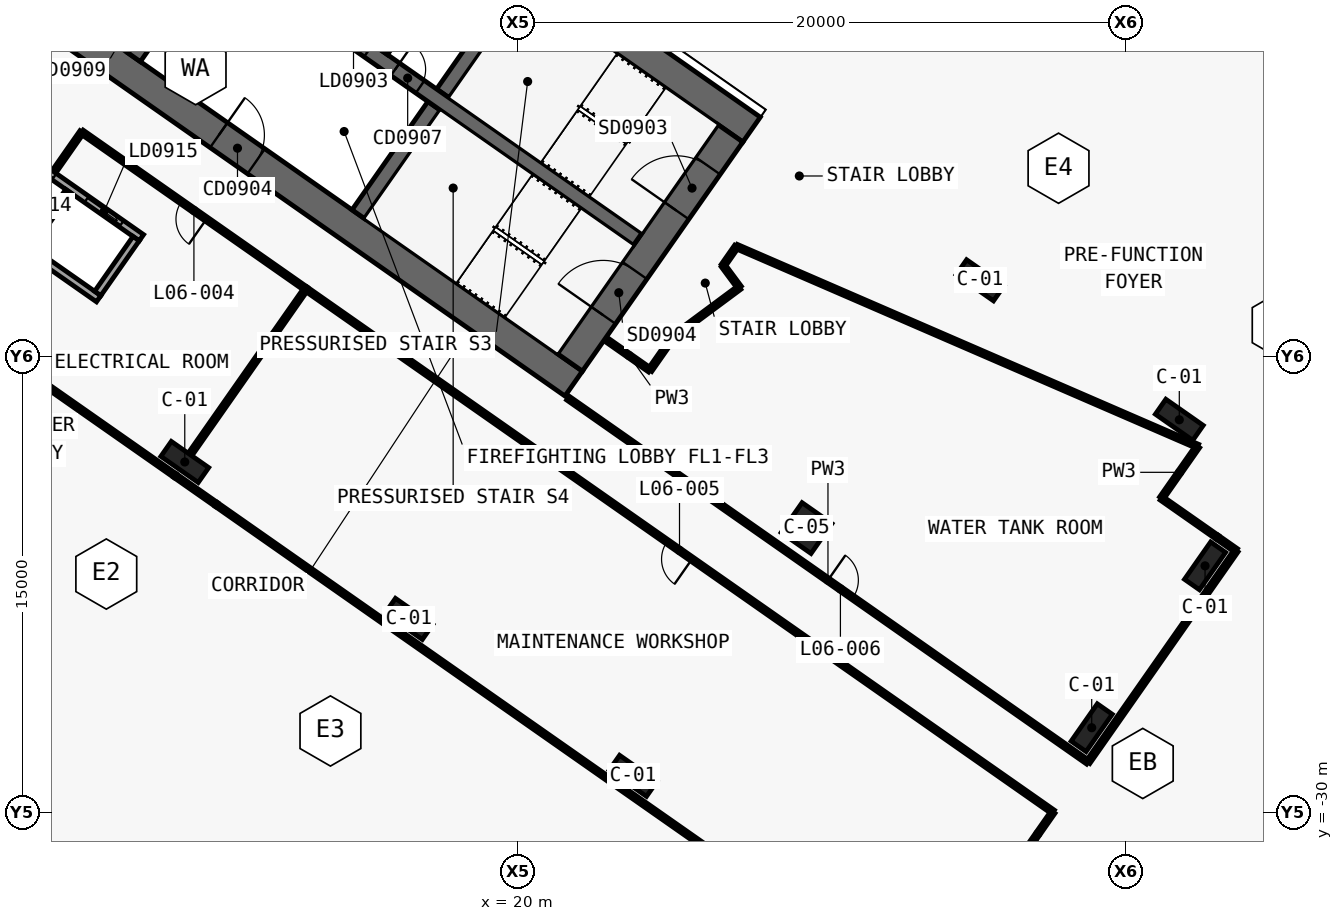
"""IFC4 building model, lengths in metres.
Left out: names, types, materials, properties, quantities, classifications, styles, units other than length and angle.
Written with IfcOpenShell. Run it as: python <this file> out.ifc"""

import sys

from ifc_helpers import new_model, si_unit, direction, frame, frame_2d, origin, origin_2d, place, context, subcontext, project, spatial, polyline, rectangle, outline, extrude, element, fill, save


model = new_model("IFC4")
c1 = context("Model", 3, precision=1e-05, world=origin(), true_north=direction((0.0, 1.0)))
c2 = subcontext(c1, "Body", "Model", "MODEL_VIEW")
j1 = project(units=[si_unit("LENGTHUNIT", "METRE"), si_unit("PLANEANGLEUNIT", "RADIAN")], contexts=[c1])
p1 = place(None, origin())
s1 = spatial("IfcSite", under=j1, at=p1, CompositionType="ELEMENT")
p2 = place(p1, origin())
s2 = spatial("IfcBuilding", under=s1, at=p2, CompositionType="ELEMENT")
p3 = place(p2, frame((0.0, 0.0, 43.0)))
s3 = spatial("IfcBuildingStorey", under=s2, at=p3, CompositionType="ELEMENT", Elevation=43.0)
p4 = place(p3, frame((-0.037, 11.867, 0.0), z_axis=(0.0, 0.0, 1.0), x_axis=(0.819155306259, -0.573571777746, 0.0)))
e1 = element("IfcWall", 1, at=p4, inside=s3, PredefinedType="SHEAR", context=c2, shape_type="SweptSolid", body=[
    extrude(outline(polyline([(33.837, 0.5), (0.0, 0.5), (0.7, -0.5), (33.837, -0.5), (33.837, 0.5)])), origin(), (0.0, 0.0, 1.0), 5.5),
])
p5 = place(p3, frame((-0.037, -0.585, 0.0), z_axis=(0.0, 0.0, 1.0), x_axis=(0.819157152511, -0.573569140985, 0.0)))
e2 = element("IfcWall", 2, at=p5, inside=s3, PredefinedType="SHEAR", context=c2, shape_type="SweptSolid", body=[
    extrude(outline(polyline([(26.695, 0.5), (0.0, 0.5), (0.7, -0.5), (26.695, -0.5), (26.695, 0.5)])), origin(), (0.0, 0.0, 1.0), 5.5),
])
p6 = place(p5, frame((1.245, 0.0, 0.0)))
e3 = element("IfcOpeningElement", 3, at=p6, cuts=e2, PredefinedType="OPENING", context=c2, shape_type="SweptSolid", body=[
    extrude(rectangle(XDim=1.5, YDim=2.1, at=frame_2d((0.75, 1.05))), frame((0.0, 0.51, 0.0), z_axis=(0.0, -1.0, 0.0), x_axis=(1.0, 0.0, 0.0)), (0.0, 0.0, 1.0), 1.02),
])
p7 = place(p5, frame((12.445, 0.0, 0.0)))
e4 = element("IfcOpeningElement", 4, at=p7, cuts=e2, PredefinedType="OPENING", context=c2, shape_type="SweptSolid", body=[
    extrude(rectangle(XDim=1.5, YDim=2.1, at=frame_2d((0.75, 1.05))), frame((0.0, 0.51, 0.0), z_axis=(0.0, -1.0, 0.0), x_axis=(1.0, 0.0, 0.0)), (0.0, 0.0, 1.0), 1.02),
])
p8 = place(p3, frame((21.708, -15.2, 0.0), z_axis=(0.0, 0.0, 1.0), x_axis=(0.573576324356, 0.819152122709, 0.0)))
e5 = element("IfcWall", 5, at=p8, inside=s3, PredefinedType="SHEAR", context=c2, shape_type="SweptSolid", body=[
    extrude(outline(polyline([(9.2, 0.5), (0.0, 0.5), (0.0, -0.5), (9.2, -0.5), (9.2, 0.5)])), origin(), (0.0, 0.0, 1.0), 5.5),
])
p9 = place(p8, frame((6.1, 0.0, 0.0)))
e6 = element("IfcOpeningElement", 6, at=p9, cuts=e5, PredefinedType="OPENING", context=c2, shape_type="SweptSolid", body=[
    extrude(rectangle(XDim=1.8, YDim=2.1, at=frame_2d((0.9, 1.05))), frame((0.0, 0.51, 0.0), z_axis=(0.0, -1.0, 0.0), x_axis=(1.0, 0.0, 0.0)), (0.0, 0.0, 1.0), 1.02),
])
p10 = place(p8, frame((1.9, 0.0, 0.0)))
e7 = element("IfcOpeningElement", 7, at=p10, cuts=e5, PredefinedType="OPENING", context=c2, shape_type="SweptSolid", body=[
    extrude(rectangle(XDim=1.8, YDim=2.1, at=frame_2d((0.9, 1.05))), frame((0.0, 0.51, 0.0), z_axis=(0.0, -1.0, 0.0), x_axis=(1.0, 0.0, 0.0)), (0.0, 0.0, 1.0), 1.02),
])
p11 = place(p3, frame((7.372, -5.162, 0.0), z_axis=(0.0, 0.0, 1.0), x_axis=(0.573594173421, 0.819139624372, 0.0)))
e8 = element("IfcWall", 8, at=p11, inside=s3, PredefinedType="SHEAR", context=c2, shape_type="SweptSolid", body=[
    extrude(outline(polyline([(0.0, 0.25), (0.0, -0.25), (4.35, -0.25), (4.35, 0.25), (0.0, 0.25)])), origin(), (0.0, 0.0, 1.0), 5.5),
])
p12 = place(p3, frame((14.745, -10.324, 0.0), z_axis=(0.0, 0.0, 1.0), x_axis=(0.57356780395, 0.819158088694, 0.0)))
e9 = element("IfcWall", 9, at=p12, inside=s3, PredefinedType="SHEAR", context=c2, shape_type="SweptSolid", body=[
    extrude(outline(polyline([(0.0, 0.25), (0.0, -0.25), (4.35, -0.25), (4.35, 0.25), (0.0, 0.25)])), origin(), (0.0, 0.0, 1.0), 5.5),
])
p13 = place(p3, frame((17.527, -6.352, 0.0), z_axis=(0.0, 0.0, 1.0), x_axis=(0.573530143085, 0.819184457233, 0.0)))
e10 = element("IfcWall", 10, at=p13, inside=s3, PredefinedType="SHEAR", context=c2, shape_type="SweptSolid", body=[
    extrude(outline(polyline([(4.35, -0.25), (4.35, 0.25), (0.0, 0.25), (0.0, -0.25), (4.35, -0.25)])), origin(), (0.0, 0.0, 1.0), 5.5),
])
p14 = place(p3, frame((2.638, 3.768, 0.0), z_axis=(0.0, 0.0, 1.0), x_axis=(0.819148977158, -0.573580816643, 0.0)))
e11 = element("IfcWall", 11, at=p14, inside=s3, PredefinedType="SHEAR", context=c2, shape_type="SweptSolid", body=[
    extrude(outline(polyline([(0.0, 0.25), (0.0, -0.25), (26.0, -0.25), (26.0, 0.25), (0.0, 0.25)])), origin(), (0.0, 0.0, 1.0), 5.5),
])
p15 = place(p14, frame((9.637, 0.0, 0.0)))
e12 = element("IfcOpeningElement", 12, at=p15, cuts=e11, PredefinedType="OPENING", context=c2, shape_type="SweptSolid", body=[
    extrude(rectangle(XDim=1.2, YDim=2.1, at=frame_2d((0.6, 1.05))), frame((0.0, 0.26, 0.0), z_axis=(0.0, -1.0, 0.0), x_axis=(1.0, 0.0, 0.0)), (0.0, 0.0, 1.0), 0.52),
])
p16 = place(p14, frame((11.812, 0.0, 0.0)))
e13 = element("IfcOpeningElement", 13, at=p16, cuts=e11, PredefinedType="OPENING", context=c2, shape_type="SweptSolid", body=[
    extrude(rectangle(XDim=1.2, YDim=2.1, at=frame_2d((0.6, 1.05))), frame((0.0, 0.26, 0.0), z_axis=(0.0, -1.0, 0.0), x_axis=(1.0, 0.0, 0.0)), (0.0, 0.0, 1.0), 0.52),
])
p17 = place(p14, frame((13.988, 0.0, 0.0)))
e14 = element("IfcOpeningElement", 14, at=p17, cuts=e11, PredefinedType="OPENING", context=c2, shape_type="SweptSolid", body=[
    extrude(rectangle(XDim=1.2, YDim=2.1, at=frame_2d((0.6, 1.05))), frame((0.0, 0.26, 0.0), z_axis=(0.0, -1.0, 0.0), x_axis=(1.0, 0.0, 0.0)), (0.0, 0.0, 1.0), 0.52),
])
p18 = place(p14, frame((16.262, 0.0, 0.0)))
e15 = element("IfcOpeningElement", 15, at=p18, cuts=e11, PredefinedType="OPENING", context=c2, shape_type="SweptSolid", body=[
    extrude(rectangle(XDim=1.0, YDim=2.1, at=frame_2d((0.5, 1.05))), frame((0.0, 0.26, 0.0), z_axis=(0.0, -1.0, 0.0), x_axis=(1.0, 0.0, 0.0)), (0.0, 0.0, 1.0), 0.52),
])
for number, where, z_axis, x_axis in (
    (16, (9.038, -18.475, 0.0), (0.0, 0.0, 1.0), (0.819, -0.574, 0.0)),
    (17, (16.41, -23.637, 0.0), (0.0, 0.0, 1.0), (0.819, -0.574, 0.0)),
    (18, (23.782, -28.799, 0.0), (0.0, 0.0, 1.0), (0.819, -0.574, 0.0)),
    (19, (35.197, -12.498, 0.0), (0.0, 0.0, 1.0), (0.819, -0.574, 0.0)),
    (20, (41.75, -17.087, 0.0), (0.0, 0.0, 1.0), (0.819, -0.574, 0.0)),
    (21, (38.869, -27.216, 0.0), (0.0, 0.0, 1.0), (0.574, 0.819, 0.0)),
    (22, (42.597, -21.892, 0.0), (0.0, 0.0, 1.0), (0.574, 0.819, 0.0)),
):
    element("IfcColumn", number, at=place(p3, frame(where, z_axis=z_axis, x_axis=x_axis)), inside=s3, PredefinedType="COLUMN", context=c2, shape_type="SweptSolid", body=[
        extrude(rectangle(XDim=1.5, YDim=0.6, at=origin_2d()), origin(), (0.0, 0.0, 1.0), 5.5),
    ])
p19 = place(p3, frame((29.49, -20.649, 0.0), z_axis=(0.0, 0.0, 1.0), x_axis=(0.819152044289, -0.573576436351, 0.0)))
e23 = element("IfcColumn", 23, at=p19, inside=s3, PredefinedType="COLUMN", context=c2, shape_type="SweptSolid", body=[
    extrude(rectangle(XDim=1.2, YDim=1.2, at=origin_2d()), origin(), (0.0, 0.0, 1.0), 5.5),
])
p20 = place(p3, frame((15.622, -5.018, 0.0), z_axis=(0.0, 0.0, 1.0), x_axis=(0.573594173421, 0.819139624372, 0.0)))
e24 = element("IfcWall", 24, at=p20, inside=s3, PredefinedType="SOLIDWALL", context=c2, shape_type="SweptSolid", body=[
    extrude(rectangle(XDim=4.35, YDim=0.2, at=frame_2d((2.175, 0.0))), origin(), (0.0, 0.0, 1.0), 5.5),
])
p21 = place(p3, frame((-2.887, -6.738, 0.0), z_axis=(0.0, 0.0, 1.0), x_axis=(0.819150280716, -0.573578954985, 0.0)))
e25 = element("IfcWall", 25, at=p21, inside=s3, PredefinedType="SOLIDWALL", context=c2, shape_type="SweptSolid", body=[
    extrude(rectangle(XDim=11.1, YDim=0.25, at=frame_2d((5.55, 0.0))), origin(), (0.0, 0.0, 1.0), 5.22),
])
p22 = place(p3, frame((-1.481, -4.731, 0.0), z_axis=(0.0, 0.0, 1.0), x_axis=(0.819150280716, -0.573578954985, 0.0)))
e26 = element("IfcWall", 26, at=p22, inside=s3, PredefinedType="SOLIDWALL", context=c2, shape_type="SweptSolid", body=[
    extrude(rectangle(XDim=11.1, YDim=0.25, at=frame_2d((5.55, 0.0))), origin(), (0.0, 0.0, 1.0), 5.22),
])
p23 = place(p22, frame((0.8, 0.0, 0.0)))
e27 = element("IfcOpeningElement", 27, at=p23, cuts=e26, PredefinedType="OPENING", context=c2, shape_type="SweptSolid", body=[
    extrude(rectangle(XDim=1.4, YDim=2.1, at=frame_2d((0.7, 1.05))), frame((0.0, 0.135, 0.0), z_axis=(0.0, -1.0, 0.0), x_axis=(1.0, 0.0, 0.0)), (0.0, 0.0, 1.0), 0.27),
])
p24 = place(p22, frame((3.5, 0.0, 0.0)))
e28 = element("IfcOpeningElement", 28, at=p24, cuts=e26, PredefinedType="OPENING", context=c2, shape_type="SweptSolid", body=[
    extrude(rectangle(XDim=1.4, YDim=2.1, at=frame_2d((0.7, 1.05))), frame((0.0, 0.135, 0.0), z_axis=(0.0, -1.0, 0.0), x_axis=(1.0, 0.0, 0.0)), (0.0, 0.0, 1.0), 0.27),
])
p25 = place(p22, frame((6.2, 0.0, 0.0)))
e29 = element("IfcOpeningElement", 29, at=p25, cuts=e26, PredefinedType="OPENING", context=c2, shape_type="SweptSolid", body=[
    extrude(rectangle(XDim=1.4, YDim=2.1, at=frame_2d((0.7, 1.05))), frame((0.0, 0.135, 0.0), z_axis=(0.0, -1.0, 0.0), x_axis=(1.0, 0.0, 0.0)), (0.0, 0.0, 1.0), 0.27),
])
p26 = place(p22, frame((8.9, 0.0, 0.0)))
e30 = element("IfcOpeningElement", 30, at=p26, cuts=e26, PredefinedType="OPENING", context=c2, shape_type="SweptSolid", body=[
    extrude(rectangle(XDim=1.4, YDim=2.1, at=frame_2d((0.7, 1.05))), frame((0.0, 0.135, 0.0), z_axis=(0.0, -1.0, 0.0), x_axis=(1.0, 0.0, 0.0)), (0.0, 0.0, 1.0), 0.27),
])
p27 = place(p3, frame((6.175, -12.93, 0.0), z_axis=(0.0, 0.0, 1.0), x_axis=(0.573559170999, 0.819164133348, 0.0)))
e31 = element("IfcWall", 31, at=p27, inside=s3, PredefinedType="SOLIDWALL", context=c2, shape_type="SweptSolid", body=[
    extrude(rectangle(XDim=2.2, YDim=0.25, at=frame_2d((1.1, 0.0))), origin(), (0.0, 0.0, 1.0), 5.22),
])
p28 = place(p3, frame((3.943, -11.367, 0.0), z_axis=(0.0, 0.0, 1.0), x_axis=(0.573507030513, 0.819200638399, 0.0)))
e32 = element("IfcWall", 32, at=p28, inside=s3, PredefinedType="SOLIDWALL", context=c2, shape_type="SweptSolid", body=[
    extrude(rectangle(XDim=2.2, YDim=0.2, at=frame_2d((1.1, 0.0))), origin(), (0.0, 0.0, 1.0), 5.22),
])
p29 = place(p3, frame((21.642, -16.375, 0.0), z_axis=(0.0, 0.0, 1.0), x_axis=(0.819148965066, -0.573580833911, 0.0)))
e33 = element("IfcWall", 33, at=p29, inside=s3, PredefinedType="PARTITIONING", context=c2, shape_type="SweptSolid", body=[
    extrude(rectangle(XDim=20.88, YDim=0.15, at=frame_2d((10.44, 0.0))), origin(), (0.0, 0.0, 1.0), 4.4),
])
p30 = place(p29, frame((10.44, 0.0, 0.0)))
e34 = element("IfcOpeningElement", 34, at=p30, cuts=e33, PredefinedType="OPENING", context=c2, shape_type="SweptSolid", body=[
    extrude(rectangle(XDim=1.0, YDim=2.1, at=frame_2d((0.5, 1.05))), frame((0.0, 0.085, 0.0), z_axis=(0.0, -1.0, 0.0), x_axis=(1.0, 0.0, 0.0)), (0.0, 0.0, 1.0), 0.17),
])
p31 = place(p3, frame((13.026, -12.783, 0.0), z_axis=(0.0, 0.0, 1.0), x_axis=(-0.81915291695, 0.57357519006, 0.0)))
e35 = element("IfcWall", 35, at=p31, inside=s3, PredefinedType="PARTITIONING", context=c2, shape_type="SweptSolid", body=[
    extrude(rectangle(XDim=9.002, YDim=0.15, at=frame_2d((4.501, 0.0))), origin(), (0.0, 0.0, 1.0), 4.5),
])
p32 = place(p31, frame((4.001, 0.0, 0.0)))
e36 = element("IfcOpeningElement", 36, at=p32, cuts=e35, PredefinedType="OPENING", context=c2, shape_type="SweptSolid", body=[
    extrude(rectangle(XDim=1.0, YDim=2.1, at=frame_2d((0.5, 1.05))), frame((0.0, 0.085, 0.0), z_axis=(0.0, -1.0, 0.0), x_axis=(1.0, 0.0, 0.0)), (0.0, 0.0, 1.0), 0.17),
])
p33 = place(p3, frame((37.599, -29.989, 0.0), z_axis=(0.0, 0.0, 1.0), x_axis=(-0.819154688631, 0.57357265982, 0.0)))
e37 = element("IfcWall", 37, at=p33, inside=s3, PredefinedType="PARTITIONING", context=c2, shape_type="SweptSolid", body=[
    extrude(rectangle(XDim=30.002, YDim=0.15, at=frame_2d((15.001, 0.0))), origin(), (0.0, 0.0, 1.0), 4.4),
])
p34 = place(p33, frame((14.501, 0.0, 0.0)))
e38 = element("IfcOpeningElement", 38, at=p34, cuts=e37, PredefinedType="OPENING", context=c2, shape_type="SweptSolid", body=[
    extrude(rectangle(XDim=1.0, YDim=2.1, at=frame_2d((0.5, 1.05))), frame((0.0, 0.085, 0.0), z_axis=(0.0, -1.0, 0.0), x_axis=(1.0, 0.0, 0.0)), (0.0, 0.0, 1.0), 0.17),
])
p35 = place(p3, frame((42.357, -17.962, 0.0), z_axis=(0.0, 0.0, 1.0), x_axis=(-0.573533201177, -0.819182316183, 0.0)))
e39 = element("IfcWall", 39, at=p35, inside=s3, PredefinedType="PARTITIONING", context=c2, shape_type="SweptSolid", body=[
    extrude(rectangle(XDim=2.081, YDim=0.15, at=frame_2d((1.041, 0.0))), origin(), (0.0, 0.0, 1.0), 4.4),
])
p36 = place(p3, frame((41.164, -19.667, 0.0), z_axis=(0.0, 0.0, 1.0), x_axis=(0.81912956014, -0.573608545704, 0.0)))
e40 = element("IfcWall", 40, at=p36, inside=s3, PredefinedType="PARTITIONING", context=c2, shape_type="SweptSolid", body=[
    extrude(rectangle(XDim=2.241, YDim=0.15, at=frame_2d((1.121, 0.0))), origin(), (0.0, 0.0, 1.0), 4.4),
])
p37 = place(p3, frame((42.998, -20.952, 0.0), z_axis=(0.0, 0.0, 1.0), x_axis=(0.819141432686, -0.573591590992, 0.0)))
e41 = element("IfcWall", 41, at=p37, inside=s3, PredefinedType="PARTITIONING", context=c2, shape_type="SweptSolid", body=[
    extrude(rectangle(XDim=0.76, YDim=0.15, at=frame_2d((0.38, 0.0))), origin(), (0.0, 0.0, 1.0), 5.1),
])
p38 = place(p3, frame((43.621, -21.388, 0.0), z_axis=(0.0, 0.0, 1.0), x_axis=(-0.57357799764, -0.819150951061, 0.0)))
e42 = element("IfcWall", 42, at=p38, inside=s3, PredefinedType="PARTITIONING", context=c2, shape_type="SweptSolid", body=[
    extrude(rectangle(XDim=8.5, YDim=0.15, at=frame_2d((4.25, 0.0))), origin(), (0.0, 0.0, 1.0), 5.1),
])
p39 = place(p3, frame((26.746, -12.014, 0.0), z_axis=(0.0, 0.0, 1.0), x_axis=(0.573761975376, 0.819022097146, 0.0)))
e43 = element("IfcWall", 43, at=p39, inside=s3, PredefinedType="PARTITIONING", context=c2, shape_type="SweptSolid", body=[
    extrude(rectangle(XDim=0.765, YDim=0.15, at=frame_2d((0.383, 0.0))), origin(), (0.0, 0.0, 1.0), 5.1),
])
p40 = place(p3, frame((27.185, -11.387, 0.0), z_axis=(0.0, 0.0, 1.0), x_axis=(0.917531384635, -0.397663372979, 0.0)))
e44 = element("IfcWall", 44, at=p40, inside=s3, PredefinedType="PARTITIONING", context=c2, shape_type="SweptSolid", body=[
    extrude(rectangle(XDim=16.536, YDim=0.15, at=frame_2d((8.268, 0.0))), origin(), (0.0, 0.0, 1.0), 4.4),
])
p41 = place(p3, frame((22.961, -14.49, 0.0), z_axis=(0.0, 0.0, 1.0), x_axis=(0.819109000826, -0.573637903879, 0.0)))
e45 = element("IfcWall", 45, at=p41, inside=s3, PredefinedType="PARTITIONING", context=c2, shape_type="SweptSolid", body=[
    extrude(rectangle(XDim=1.68, YDim=0.15, at=frame_2d((0.84, 0.0))), origin(), (0.0, 0.0, 1.0), 5.1),
])
p42 = place(p3, frame((24.337, -15.454, 0.0), z_axis=(0.0, 0.0, 1.0), x_axis=(0.573571252353, 0.819155674139, 0.0)))
e46 = element("IfcWall", 46, at=p42, inside=s3, PredefinedType="PARTITIONING", context=c2, shape_type="SweptSolid", body=[
    extrude(rectangle(XDim=1.354, YDim=0.15, at=frame_2d((0.677, 0.0))), origin(), (0.0, 0.0, 1.0), 5.1),
])
p43 = place(p3, frame((25.114, -14.345, 0.0), z_axis=(0.0, 0.0, 1.0), x_axis=(0.803211070557, 0.595694532571, 0.0)))
e47 = element("IfcWall", 47, at=p43, inside=s3, PredefinedType="PARTITIONING", context=c2, shape_type="SweptSolid", body=[
    extrude(rectangle(XDim=2.7, YDim=0.15, at=frame_2d((1.35, 0.0))), origin(), (0.0, 0.0, 1.0), 5.1),
])
p44 = place(p3, frame((27.282, -12.737, 0.0), z_axis=(0.0, 0.0, 1.0), x_axis=(-0.595869495235, 0.803081281471, 0.0)))
e48 = element("IfcWall", 48, at=p44, inside=s3, PredefinedType="PARTITIONING", context=c2, shape_type="SweptSolid", body=[
    extrude(rectangle(XDim=0.9, YDim=0.15, at=frame_2d((0.45, 0.0))), origin(), (0.0, 0.0, 1.0), 5.1),
])
p45 = place(p3, frame((13.024, -12.782, 0.0), z_axis=(0.0, 0.0, 1.0), x_axis=(-0.573556251799, -0.819166177294, 0.0)))
e49 = element("IfcWall", 49, at=p45, inside=s3, PredefinedType="PARTITIONING", context=c2, shape_type="SweptSolid", body=[
    extrude(rectangle(XDim=6.63, YDim=0.15, at=frame_2d((3.315, 0.0))), origin(), (0.0, 0.0, 1.0), 4.5),
])
p46 = place(p3, frame((8.722, -18.926, 0.0), z_axis=(0.0, 0.0, 1.0), x_axis=(-0.819141427692, 0.573591598124, 0.0)))
e50 = element("IfcWall", 50, at=p46, inside=s3, PredefinedType="PARTITIONING", context=c2, shape_type="SweptSolid", body=[
    extrude(rectangle(XDim=9.0, YDim=0.15, at=frame_2d((4.5, 0.0))), origin(), (0.0, 0.0, 1.0), 5.1),
])
p47 = place(p3, frame((4.763, -8.889, 0.0), z_axis=(0.0, 0.0, 1.0), x_axis=(0.573494057365, 0.819209720504, 0.0)))
e51 = element("IfcWall", 51, at=p47, inside=s3, PredefinedType="PARTITIONING", context=c2, shape_type="SweptSolid", body=[
    extrude(rectangle(XDim=1.55, YDim=0.15, at=frame_2d((0.775, 0.0))), origin(), (0.0, 0.0, 1.0), 4.5),
])
p48 = place(p3, frame((30.839, -34.412, 0.0), z_axis=(0.0, 0.0, 1.0), x_axis=(-0.819153188106, 0.573574802808, 0.0)))
e52 = element("IfcWall", 52, at=p48, inside=s3, PredefinedType="PARTITIONING", context=c2, shape_type="SweptSolid", body=[
    extrude(rectangle(XDim=25.351, YDim=0.15, at=frame_2d((12.675, 0.0))), origin(), (0.0, 0.0, 1.0), 4.08),
])
p49 = place(p3, frame((37.599, -29.989, 0.0), z_axis=(0.0, 0.0, 1.0), x_axis=(-0.573575034625, -0.819153025786, 0.0)))
e53 = element("IfcWall", 53, at=p49, inside=s3, PredefinedType="PARTITIONING", context=c2, shape_type="SweptSolid", body=[
    extrude(rectangle(XDim=1.745, YDim=0.15, at=frame_2d((0.872, 0.0))), origin(), (0.0, 0.0, 1.0), 5.1),
])
p50 = place(p3, frame((10.075, -19.873, 0.0), z_axis=(0.0, 0.0, 1.0), x_axis=(-0.819190252408, 0.573521865634, 0.0)))
e54 = element("IfcWall", 54, at=p50, inside=s3, PredefinedType="PARTITIONING", context=c2, shape_type="SweptSolid", body=[
    extrude(rectangle(XDim=1.652, YDim=0.15, at=frame_2d((0.826, 0.0))), origin(), (0.0, 0.0, 1.0), 4.08),
])
p51 = place(p18, origin())
e55 = element("IfcDoor", 55, at=p51, inside=s3, OperationType="SINGLE_SWING_RIGHT", PredefinedType="DOOR", context=c2, shape_type="SweptSolid", body=[
    extrude(rectangle(XDim=1.0, YDim=2.1, at=frame_2d((0.5, 1.05))), frame((0.0, 0.025, 0.0), z_axis=(0.0, -1.0, 0.0), x_axis=(1.0, 0.0, 0.0)), (0.0, 0.0, 1.0), 0.05),
])
fill(e15, e55)
p52 = place(p7, origin())
e56 = element("IfcDoor", 56, at=p52, inside=s3, OperationType="DOUBLE_DOOR_SINGLE_SWING", PredefinedType="DOOR", context=c2, shape_type="SweptSolid", body=[
    extrude(rectangle(XDim=1.5, YDim=2.1, at=frame_2d((0.75, 1.05))), frame((0.0, 0.025, 0.0), z_axis=(0.0, -1.0, 0.0), x_axis=(1.0, 0.0, 0.0)), (0.0, 0.0, 1.0), 0.05),
])
fill(e4, e56)
p53 = place(p9, origin())
e57 = element("IfcDoor", 57, at=p53, inside=s3, OperationType="DOUBLE_DOOR_SINGLE_SWING", PredefinedType="DOOR", context=c2, shape_type="SweptSolid", body=[
    extrude(rectangle(XDim=1.8, YDim=2.1, at=frame_2d((0.9, 1.05))), frame((0.0, 0.025, 0.0), z_axis=(0.0, -1.0, 0.0), x_axis=(1.0, 0.0, 0.0)), (0.0, 0.0, 1.0), 0.05),
])
fill(e6, e57)
p54 = place(p10, origin())
e58 = element("IfcDoor", 58, at=p54, inside=s3, OperationType="DOUBLE_DOOR_SINGLE_SWING", PredefinedType="DOOR", context=c2, shape_type="SweptSolid", body=[
    extrude(rectangle(XDim=1.8, YDim=2.1, at=frame_2d((0.9, 1.05))), frame((0.0, 0.025, 0.0), z_axis=(0.0, -1.0, 0.0), x_axis=(1.0, 0.0, 0.0)), (0.0, 0.0, 1.0), 0.05),
])
fill(e7, e58)
p55 = place(p25, origin())
e59 = element("IfcDoor", 59, at=p55, inside=s3, OperationType="SLIDING_TO_LEFT", PredefinedType="DOOR", context=c2, shape_type="SweptSolid", body=[
    extrude(rectangle(XDim=1.4, YDim=2.1, at=frame_2d((0.7, 1.05))), frame((0.0, 0.025, 0.0), z_axis=(0.0, -1.0, 0.0), x_axis=(1.0, 0.0, 0.0)), (0.0, 0.0, 1.0), 0.05),
])
fill(e29, e59)
p56 = place(p26, origin())
e60 = element("IfcDoor", 60, at=p56, inside=s3, OperationType="SLIDING_TO_RIGHT", PredefinedType="DOOR", context=c2, shape_type="SweptSolid", body=[
    extrude(rectangle(XDim=1.4, YDim=2.1, at=frame_2d((0.7, 1.05))), frame((0.0, 0.025, 0.0), z_axis=(0.0, -1.0, 0.0), x_axis=(1.0, 0.0, 0.0)), (0.0, 0.0, 1.0), 0.05),
])
fill(e30, e60)
p57 = place(p32, origin())
e61 = element("IfcDoor", 61, at=p57, inside=s3, OperationType="SINGLE_SWING_LEFT", PredefinedType="DOOR", context=c2, shape_type="SweptSolid", body=[
    extrude(rectangle(XDim=1.0, YDim=2.1, at=frame_2d((0.5, 1.05))), frame((0.0, 0.025, 0.0), z_axis=(0.0, -1.0, 0.0), x_axis=(1.0, 0.0, 0.0)), (0.0, 0.0, 1.0), 0.05),
])
fill(e36, e61)
p58 = place(p34, origin())
e62 = element("IfcDoor", 62, at=p58, inside=s3, OperationType="SINGLE_SWING_LEFT", PredefinedType="DOOR", context=c2, shape_type="SweptSolid", body=[
    extrude(rectangle(XDim=1.0, YDim=2.1, at=frame_2d((0.5, 1.05))), frame((0.0, 0.025, 0.0), z_axis=(0.0, -1.0, 0.0), x_axis=(1.0, 0.0, 0.0)), (0.0, 0.0, 1.0), 0.05),
])
fill(e38, e62)
p59 = place(p30, origin())
e63 = element("IfcDoor", 63, at=p59, inside=s3, OperationType="SINGLE_SWING_LEFT", PredefinedType="DOOR", context=c2, shape_type="SweptSolid", body=[
    extrude(rectangle(XDim=1.0, YDim=2.1, at=frame_2d((0.5, 1.05))), frame((0.0, 0.025, 0.0), z_axis=(0.0, -1.0, 0.0), x_axis=(1.0, 0.0, 0.0)), (0.0, 0.0, 1.0), 0.05),
])
fill(e34, e63)
save(model, sys.argv[1])
